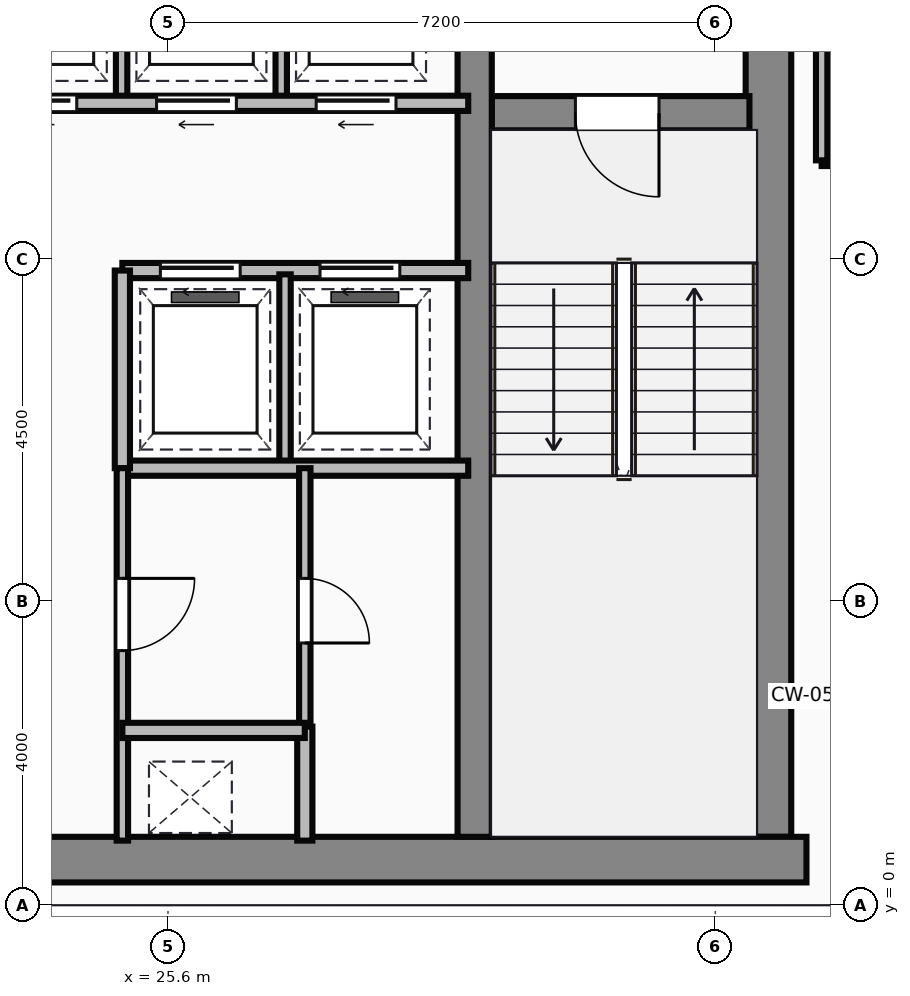
"""IFC4 building model, lengths in metres.
Left out: names, types, materials, properties, quantities, classifications, styles, units other than length and angle.
Written with IfcOpenShell. Run it as: python <this file> out.ifc"""

import sys

from ifc_helpers import new_model, si_unit, direction, frame, frame_2d, origin, place, context, subcontext, project, spatial, rectangle, extrude, source, transform, mapped, element, fill, save


model = new_model("IFC4")
c1 = context("Model", 3, precision=1e-05, world=origin(), true_north=direction((0.0, 1.0)))
c2 = subcontext(c1, "Body", "Model", "MODEL_VIEW")
j1 = project(units=[si_unit("LENGTHUNIT", "METRE"), si_unit("PLANEANGLEUNIT", "RADIAN")], contexts=[c1])
p1 = place(None, origin())
s1 = spatial("IfcSite", under=j1, at=p1, CompositionType="ELEMENT")
p2 = place(p1, origin())
s2 = spatial("IfcBuilding", under=s1, at=p2, CompositionType="ELEMENT")
p3 = place(p2, frame((0.0, 0.0, 240.55)))
s3 = spatial("IfcBuildingStorey", under=s2, at=p3, CompositionType="ELEMENT", Elevation=240.55)
m1 = source(origin(), c2, "Body", "SweptSolid", [
    extrude(rectangle(XDim=29.5, YDim=0.6, at=frame_2d((14.75, 0.0))), origin(), (0.0, 0.0, 1.0), 3.65),
])
p4 = place(p3, frame((4.5, 0.6, 0.0), z_axis=(0.0, 0.0, 1.0), x_axis=(1.0, 0.0, 0.0)))
e1 = element("IfcWall", 1, at=p4, inside=s3, PredefinedType="SHEAR", context=c2, shape_type="MappedRepresentation", body=[
    mapped(m1, transform((0.0, 0.0, 0.0))),
])
m2 = source(origin(), c2, "Body", "SweptSolid", [
    extrude(rectangle(XDim=13.1, YDim=0.6, at=frame_2d((6.55, 0.0))), origin(), (0.0, 0.0, 1.0), 3.65),
])
p5 = place(p3, frame((33.5, 0.9, 0.0), z_axis=(0.0, 0.0, 1.0), x_axis=(0.0, 1.0, 0.0)))
e2 = element("IfcWall", 2, at=p5, inside=s3, PredefinedType="SHEAR", context=c2, shape_type="MappedRepresentation", body=[
    mapped(m2, transform((0.0, 0.0, 0.0))),
])
m3 = source(origin(), c2, "Body", "SweptSolid", [
    extrude(rectangle(XDim=12.5, YDim=0.45, at=frame_2d((6.25, 0.0))), origin(), (0.0, 0.0, 1.0), 3.65),
])
p6 = place(p3, frame((29.635, 0.9, 0.0), z_axis=(0.0, 0.0, 1.0), x_axis=(0.0, 1.0, 0.0)))
e3 = element("IfcWall", 3, at=p6, inside=s3, PredefinedType="SHEAR", context=c2, shape_type="MappedRepresentation", body=[
    mapped(m3, transform((0.0, 0.0, 0.0))),
])
m4 = source(origin(), c2, "Body", "SweptSolid", [
    extrude(rectangle(XDim=3.39, YDim=0.45, at=frame_2d((1.695, 0.0))), origin(), (0.0, 0.0, 1.0), 3.65),
])
p7 = place(p3, frame((29.86, 10.42, 0.0), z_axis=(0.0, 0.0, 1.0), x_axis=(1.0, 0.0, 0.0)))
e4 = element("IfcWall", 4, at=p7, inside=s3, PredefinedType="SHEAR", context=c2, shape_type="MappedRepresentation", body=[
    mapped(m4, transform((0.0, 0.0, 0.0))),
])
p8 = place(p7, frame((1.1, 0.0, 0.0)))
e5 = element("IfcOpeningElement", 5, at=p8, cuts=e4, PredefinedType="OPENING", context=c2, shape_type="SweptSolid", body=[
    extrude(rectangle(XDim=1.1, YDim=2.15, at=frame_2d((0.55, 1.075))), frame((0.0, 0.235, 0.0), z_axis=(0.0, -1.0, 0.0), x_axis=(1.0, 0.0, 0.0)), (0.0, 0.0, 1.0), 0.47),
])
m5 = source(origin(), c2, "Body", "SweptSolid", [
    extrude(rectangle(XDim=8.8, YDim=0.2, at=frame_2d((4.4, 0.0))), origin(), (0.0, 0.0, 1.0), 3.4),
])
p9 = place(p3, frame((20.75, 10.55, 0.0), z_axis=(0.0, 0.0, 1.0), x_axis=(1.0, 0.0, 0.0)))
e6 = element("IfcWall", 6, at=p9, inside=s3, PredefinedType="PARTITIONING", context=c2, shape_type="MappedRepresentation", body=[
    mapped(m5, transform((0.0, 0.0, 0.0))),
])
p10 = place(p9, frame((0.5, 0.0, 0.0)))
e7 = element("IfcOpeningElement", 7, at=p10, cuts=e6, PredefinedType="OPENING", context=c2, shape_type="SweptSolid", body=[
    extrude(rectangle(XDim=1.05, YDim=2.15, at=frame_2d((0.525, 1.075))), frame((0.0, 0.11, 0.0), z_axis=(0.0, -1.0, 0.0), x_axis=(1.0, 0.0, 0.0)), (0.0, 0.0, 1.0), 0.22),
])
p11 = place(p9, frame((2.6, 0.0, 0.0)))
e8 = element("IfcOpeningElement", 8, at=p11, cuts=e6, PredefinedType="OPENING", context=c2, shape_type="SweptSolid", body=[
    extrude(rectangle(XDim=1.05, YDim=2.15, at=frame_2d((0.525, 1.075))), frame((0.0, 0.11, 0.0), z_axis=(0.0, -1.0, 0.0), x_axis=(1.0, 0.0, 0.0)), (0.0, 0.0, 1.0), 0.22),
])
p12 = place(p9, frame((4.7, 0.0, 0.0)))
e9 = element("IfcOpeningElement", 9, at=p12, cuts=e6, PredefinedType="OPENING", context=c2, shape_type="SweptSolid", body=[
    extrude(rectangle(XDim=1.05, YDim=2.15, at=frame_2d((0.525, 1.075))), frame((0.0, 0.11, 0.0), z_axis=(0.0, -1.0, 0.0), x_axis=(1.0, 0.0, 0.0)), (0.0, 0.0, 1.0), 0.22),
])
p13 = place(p9, frame((6.8, 0.0, 0.0)))
e10 = element("IfcOpeningElement", 10, at=p13, cuts=e6, PredefinedType="OPENING", context=c2, shape_type="SweptSolid", body=[
    extrude(rectangle(XDim=1.05, YDim=2.15, at=frame_2d((0.525, 1.075))), frame((0.0, 0.11, 0.0), z_axis=(0.0, -1.0, 0.0), x_axis=(1.0, 0.0, 0.0)), (0.0, 0.0, 1.0), 0.22),
])
m6 = source(origin(), c2, "Body", "SweptSolid", [
    extrude(rectangle(XDim=2.85, YDim=0.15, at=frame_2d((1.425, 0.0))), origin(), (0.0, 0.0, 1.0), 3.4),
])
for number, where, z_axis, x_axis in (
    (11, (24.99, 10.6, 0.0), (0.0, 0.0, 1.0), (0.0, 1.0, 0.0)),
    (12, (27.09, 10.6, 0.0), (0.0, 0.0, 1.0), (0.0, 1.0, 0.0)),
):
    element("IfcWall", number, at=place(p3, frame(where, z_axis=z_axis, x_axis=x_axis)), inside=s3, PredefinedType="PARTITIONING", context=c2, shape_type="MappedRepresentation", body=[
        mapped(m6, transform((0.0, 0.0, 0.0))),
    ])
m7 = source(origin(), c2, "Body", "SweptSolid", [
    extrude(rectangle(XDim=4.55, YDim=0.2, at=frame_2d((2.275, 0.0))), origin(), (0.0, 0.0, 1.0), 3.4),
])
p14 = place(p3, frame((25.0, 8.35, 0.0), z_axis=(0.0, 0.0, 1.0), x_axis=(1.0, 0.0, 0.0)))
e13 = element("IfcWall", 13, at=p14, inside=s3, PredefinedType="PARTITIONING", context=c2, shape_type="MappedRepresentation", body=[
    mapped(m7, transform((0.0, 0.0, 0.0))),
])
p15 = place(p14, frame((0.5, 0.0, 0.0)))
e14 = element("IfcOpeningElement", 14, at=p15, cuts=e13, PredefinedType="OPENING", context=c2, shape_type="SweptSolid", body=[
    extrude(rectangle(XDim=1.05, YDim=2.15, at=frame_2d((0.525, 1.075))), frame((0.0, 0.11, 0.0), z_axis=(0.0, -1.0, 0.0), x_axis=(1.0, 0.0, 0.0)), (0.0, 0.0, 1.0), 0.22),
])
p16 = place(p14, frame((2.6, 0.0, 0.0)))
e15 = element("IfcOpeningElement", 15, at=p16, cuts=e13, PredefinedType="OPENING", context=c2, shape_type="SweptSolid", body=[
    extrude(rectangle(XDim=1.05, YDim=2.15, at=frame_2d((0.525, 1.075))), frame((0.0, 0.11, 0.0), z_axis=(0.0, -1.0, 0.0), x_axis=(1.0, 0.0, 0.0)), (0.0, 0.0, 1.0), 0.22),
])
p17 = place(p3, frame((25.0, 5.75, 0.0), z_axis=(0.0, 0.0, 1.0), x_axis=(1.0, 0.0, 0.0)))
e16 = element("IfcWall", 16, at=p17, inside=s3, PredefinedType="PARTITIONING", context=c2, shape_type="MappedRepresentation", body=[
    mapped(m7, transform((0.0, 0.0, 0.0))),
])
m8 = source(origin(), c2, "Body", "SweptSolid", [
    extrude(rectangle(XDim=2.6, YDim=0.2, at=frame_2d((1.3, 0.0))), origin(), (0.0, 0.0, 1.0), 3.4),
])
p18 = place(p3, frame((25.0, 5.75, 0.0), z_axis=(0.0, 0.0, 1.0), x_axis=(0.0, 1.0, 0.0)))
e17 = element("IfcWall", 17, at=p18, inside=s3, PredefinedType="PARTITIONING", context=c2, shape_type="MappedRepresentation", body=[
    mapped(m8, transform((0.0, 0.0, 0.0))),
])
m9 = source(origin(), c2, "Body", "SweptSolid", [
    extrude(rectangle(XDim=2.5, YDim=0.15, at=frame_2d((1.25, 0.0))), origin(), (0.0, 0.0, 1.0), 3.4),
])
p19 = place(p3, frame((27.14, 5.8, 0.0), z_axis=(0.0, 0.0, 1.0), x_axis=(0.0, 1.0, 0.0)))
e18 = element("IfcWall", 18, at=p19, inside=s3, PredefinedType="PARTITIONING", context=c2, shape_type="MappedRepresentation", body=[
    mapped(m9, transform((0.0, 0.0, 0.0))),
])
m10 = source(origin(), c2, "Body", "SweptSolid", [
    extrude(rectangle(XDim=4.9, YDim=0.15, at=frame_2d((2.45, 0.0))), origin(), (0.0, 0.0, 1.0), 3.4),
])
p20 = place(p3, frame((25.0, 0.85, 0.0), z_axis=(0.0, 0.0, 1.0), x_axis=(0.0, 1.0, 0.0)))
e19 = element("IfcWall", 19, at=p20, inside=s3, PredefinedType="PARTITIONING", context=c2, shape_type="MappedRepresentation", body=[
    mapped(m10, transform((0.0, 0.0, 0.0))),
])
p21 = place(p20, frame((2.5, 0.0, 0.0)))
e20 = element("IfcOpeningElement", 20, at=p21, cuts=e19, PredefinedType="OPENING", context=c2, shape_type="SweptSolid", body=[
    extrude(rectangle(XDim=0.95, YDim=2.15, at=frame_2d((0.475, 1.075))), frame((0.0, 0.085, 0.0), z_axis=(0.0, -1.0, 0.0), x_axis=(1.0, 0.0, 0.0)), (0.0, 0.0, 1.0), 0.17),
])
m11 = source(origin(), c2, "Body", "SweptSolid", [
    extrude(rectangle(XDim=2.4, YDim=0.2, at=frame_2d((1.2, 0.0))), origin(), (0.0, 0.0, 1.0), 3.4),
])
p22 = place(p3, frame((25.0, 2.3, 0.0), z_axis=(0.0, 0.0, 1.0), x_axis=(1.0, 0.0, 0.0)))
e21 = element("IfcWall", 21, at=p22, inside=s3, PredefinedType="PARTITIONING", context=c2, shape_type="MappedRepresentation", body=[
    mapped(m11, transform((0.0, 0.0, 0.0))),
])
m12 = source(origin(), c2, "Body", "SweptSolid", [
    extrude(rectangle(XDim=1.5, YDim=0.2, at=frame_2d((0.75, 0.0))), origin(), (0.0, 0.0, 1.0), 3.4),
])
p23 = place(p3, frame((27.4, 0.85, 0.0), z_axis=(0.0, 0.0, 1.0), x_axis=(0.0, 1.0, 0.0)))
e22 = element("IfcWall", 22, at=p23, inside=s3, PredefinedType="PARTITIONING", context=c2, shape_type="MappedRepresentation", body=[
    mapped(m12, transform((0.0, 0.0, 0.0))),
])
m13 = source(origin(), c2, "Body", "SweptSolid", [
    extrude(rectangle(XDim=3.4, YDim=0.15, at=frame_2d((1.7, 0.0))), origin(), (0.0, 0.0, 1.0), 3.4),
])
p24 = place(p3, frame((27.4, 2.35, 0.0), z_axis=(0.0, 0.0, 1.0), x_axis=(0.0, 1.0, 0.0)))
e23 = element("IfcWall", 23, at=p24, inside=s3, PredefinedType="PARTITIONING", context=c2, shape_type="MappedRepresentation", body=[
    mapped(m13, transform((0.0, 0.0, 0.0))),
])
p25 = place(p24, frame((1.1, 0.0, 0.0)))
e24 = element("IfcOpeningElement", 24, at=p25, cuts=e23, PredefinedType="OPENING", context=c2, shape_type="SweptSolid", body=[
    extrude(rectangle(XDim=0.85, YDim=2.1, at=frame_2d((0.425, 1.05))), frame((0.0, 0.085, 0.0), z_axis=(0.0, -1.0, 0.0), x_axis=(1.0, 0.0, 0.0)), (0.0, 0.0, 1.0), 0.17),
])
m14 = source(origin(), c2, "Body", "SweptSolid", [
    extrude(rectangle(XDim=4.8, YDim=0.15, at=frame_2d((2.4, 0.0))), origin(), (0.0, 0.0, 1.0), 3.4),
])
p26 = place(p3, frame((34.2, 9.8, 0.0), z_axis=(0.0, 0.0, 1.0), x_axis=(1.0, 0.0, 0.0)))
e25 = element("IfcWall", 25, at=p26, inside=s3, PredefinedType="PARTITIONING", context=c2, shape_type="MappedRepresentation", body=[
    mapped(m14, transform((0.0, 0.0, 0.0))),
])
m15 = source(origin(), c2, "Body", "SweptSolid", [
    extrude(rectangle(XDim=4.18, YDim=0.15, at=frame_2d((2.09, 0.0))), origin(), (0.0, 0.0, 1.0), 3.4),
])
p27 = place(p3, frame((34.2, 9.8, 0.0), z_axis=(0.0, 0.0, 1.0), x_axis=(0.0, 1.0, 0.0)))
e26 = element("IfcWall", 26, at=p27, inside=s3, PredefinedType="PARTITIONING", context=c2, shape_type="MappedRepresentation", body=[
    mapped(m15, transform((0.0, 0.0, 0.0))),
])
m16 = source(origin(), c2, "Body", "SweptSolid", [
    extrude(rectangle(XDim=1.1, YDim=2.15, at=frame_2d((0.55, 1.075))), frame((0.0, 0.025, 0.0), z_axis=(0.0, -1.0, 0.0), x_axis=(1.0, 0.0, 0.0)), (0.0, 0.0, 1.0), 0.05),
])
p28 = place(p8, frame((1.1, 0.0, 0.0), z_axis=(0.0, 0.0, 1.0), x_axis=(-1.0, 0.0, 0.0)))
e27 = element("IfcDoor", 27, at=p28, inside=s3, OperationType="SINGLE_SWING_RIGHT", PredefinedType="DOOR", context=c2, shape_type="MappedRepresentation", body=[
    mapped(m16, transform((0.0, 0.0, 0.0))),
])
fill(e5, e27)
m17 = source(origin(), c2, "Body", "SweptSolid", [
    extrude(rectangle(XDim=1.05, YDim=2.15, at=frame_2d((0.525, 1.075))), frame((0.0, 0.025, 0.0), z_axis=(0.0, -1.0, 0.0), x_axis=(1.0, 0.0, 0.0)), (0.0, 0.0, 1.0), 0.05),
])
p29 = place(p11, frame((1.05, 0.0, 0.0), z_axis=(0.0, 0.0, 1.0), x_axis=(-1.0, 0.0, 0.0)))
e28 = element("IfcDoor", 28, at=p29, inside=s3, OperationType="SLIDING_TO_LEFT", PredefinedType="DOOR", context=c2, shape_type="MappedRepresentation", body=[
    mapped(m17, transform((0.0, 0.0, 0.0))),
])
fill(e8, e28)
p30 = place(p12, frame((1.05, 0.0, 0.0), z_axis=(0.0, 0.0, 1.0), x_axis=(-1.0, 0.0, 0.0)))
e29 = element("IfcDoor", 29, at=p30, inside=s3, OperationType="SLIDING_TO_LEFT", PredefinedType="DOOR", context=c2, shape_type="MappedRepresentation", body=[
    mapped(m17, transform((0.0, 0.0, 0.0))),
])
fill(e9, e29)
p31 = place(p13, frame((1.05, 0.0, 0.0), z_axis=(0.0, 0.0, 1.0), x_axis=(-1.0, 0.0, 0.0)))
e30 = element("IfcDoor", 30, at=p31, inside=s3, OperationType="SLIDING_TO_LEFT", PredefinedType="DOOR", context=c2, shape_type="MappedRepresentation", body=[
    mapped(m17, transform((0.0, 0.0, 0.0))),
])
fill(e10, e30)
p32 = place(p15, origin())
e31 = element("IfcDoor", 31, at=p32, inside=s3, OperationType="SLIDING_TO_LEFT", PredefinedType="DOOR", context=c2, shape_type="MappedRepresentation", body=[
    mapped(m17, transform((0.0, 0.0, 0.0))),
])
fill(e14, e31)
p33 = place(p16, origin())
e32 = element("IfcDoor", 32, at=p33, inside=s3, OperationType="SLIDING_TO_LEFT", PredefinedType="DOOR", context=c2, shape_type="MappedRepresentation", body=[
    mapped(m17, transform((0.0, 0.0, 0.0))),
])
fill(e15, e32)
m18 = source(origin(), c2, "Body", "SweptSolid", [
    extrude(rectangle(XDim=0.95, YDim=2.15, at=frame_2d((0.475, 1.075))), frame((0.0, 0.025, 0.0), z_axis=(0.0, -1.0, 0.0), x_axis=(1.0, 0.0, 0.0)), (0.0, 0.0, 1.0), 0.05),
])
p34 = place(p21, origin())
e33 = element("IfcDoor", 33, at=p34, inside=s3, OperationType="SINGLE_SWING_RIGHT", PredefinedType="DOOR", context=c2, shape_type="MappedRepresentation", body=[
    mapped(m18, transform((0.0, 0.0, 0.0))),
])
fill(e20, e33)
m19 = source(origin(), c2, "Body", "SweptSolid", [
    extrude(rectangle(XDim=0.85, YDim=2.1, at=frame_2d((0.425, 1.05))), frame((0.0, 0.025, 0.0), z_axis=(0.0, -1.0, 0.0), x_axis=(1.0, 0.0, 0.0)), (0.0, 0.0, 1.0), 0.05),
])
p35 = place(p25, frame((0.85, 0.0, 0.0), z_axis=(0.0, 0.0, 1.0), x_axis=(-1.0, 0.0, 0.0)))
e34 = element("IfcDoor", 34, at=p35, inside=s3, OperationType="SINGLE_SWING_LEFT", PredefinedType="DOOR", context=c2, shape_type="MappedRepresentation", body=[
    mapped(m19, transform((0.0, 0.0, 0.0))),
])
fill(e24, e34)
save(model, sys.argv[1])
